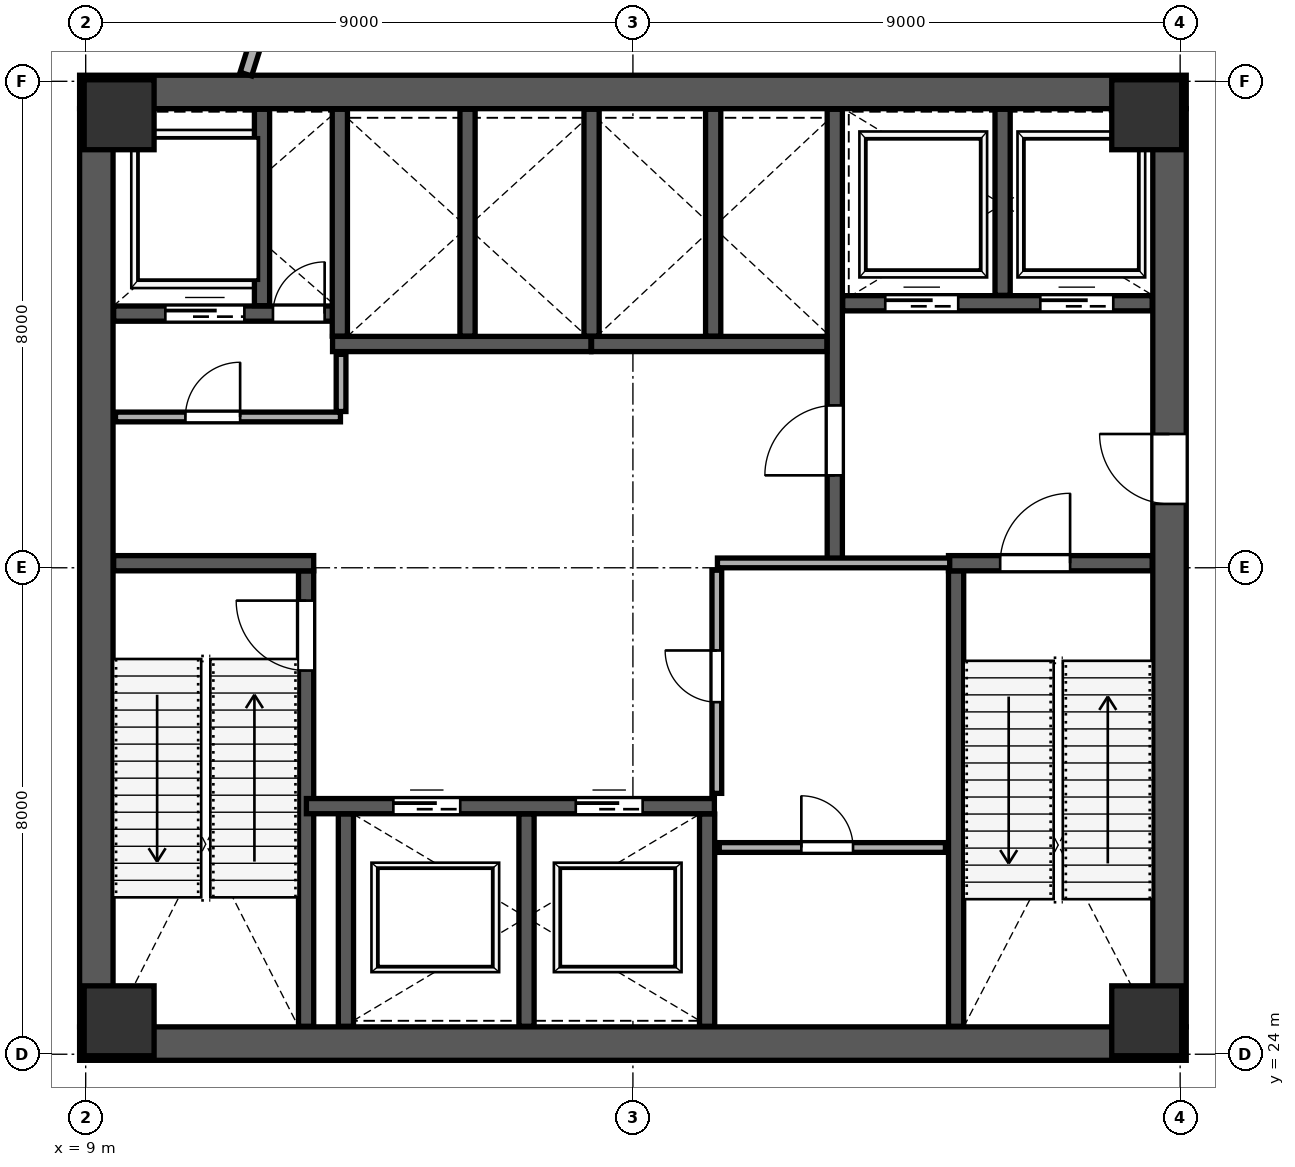
"""IFC4 building model, lengths in metres.
Left out: names, types, materials, properties, quantities, classifications, styles, units other than length and angle.
Written with IfcOpenShell. Run it as: python <this file> out.ifc"""

import sys

from ifc_helpers import new_model, si_unit, direction, frame, frame_2d, origin, origin_2d, place, context, subcontext, project, spatial, rectangle, extrude, source, transform, mapped, element, fill, save


model = new_model("IFC4")
c1 = context("Model", 3, precision=1e-05, world=origin(), true_north=direction((0.0, 1.0)))
c2 = subcontext(c1, "Body", "Model", "MODEL_VIEW")
j1 = project(units=[si_unit("LENGTHUNIT", "METRE"), si_unit("PLANEANGLEUNIT", "RADIAN")], contexts=[c1])
p1 = place(None, origin())
s1 = spatial("IfcSite", under=j1, at=p1, CompositionType="ELEMENT")
p2 = place(p1, origin())
s2 = spatial("IfcBuilding", under=s1, at=p2, CompositionType="ELEMENT")
p3 = place(p2, frame((0.0, 0.0, 122.2)))
s3 = spatial("IfcBuildingStorey", under=s2, at=p3, CompositionType="ELEMENT", Elevation=122.2)
m1 = source(origin(), c2, "Body", "SweptSolid", [
    extrude(rectangle(XDim=1.15, YDim=1.15, at=origin_2d()), origin(), (0.0, 0.0, 1.0), 5.399),
])
for number, where, z_axis, x_axis in (
    (1, (9.55, 24.55, 0.001), (0.0, 0.0, 1.0), (1.0, 0.0, 0.0)),
    (2, (26.45, 24.55, 0.001), (0.0, 0.0, 1.0), (1.0, 0.0, 0.0)),
    (3, (9.55, 39.45, 0.001), (0.0, 0.0, 1.0), (1.0, 0.0, 0.0)),
    (4, (26.45, 39.45, 0.001), (0.0, 0.0, 1.0), (1.0, 0.0, 0.0)),
):
    element("IfcColumn", number, at=place(p3, frame(where, z_axis=z_axis, x_axis=x_axis)), inside=s3, PredefinedType="COLUMN", context=c2, shape_type="MappedRepresentation", body=[
        mapped(m1, transform((0.0, 0.0, 0.0), scale=1.0)),
    ])
p4 = place(p3, frame((9.175, 24.45, 0.0), z_axis=(0.0, 0.0, 1.0), x_axis=(0.0, 1.0, 0.0)))
e5 = element("IfcWall", 5, at=p4, inside=s3, PredefinedType="SHEAR", context=c2, shape_type="SweptSolid", body=[
    extrude(rectangle(XDim=15.1, YDim=0.55, at=frame_2d((7.55, 0.0))), origin(), (0.0, 0.0, 1.0), 5.12),
])
p5 = place(p3, frame((26.825, 24.45, 0.0), z_axis=(0.0, 0.0, 1.0), x_axis=(0.0, 1.0, 0.0)))
e6 = element("IfcWall", 6, at=p5, inside=s3, PredefinedType="SHEAR", context=c2, shape_type="SweptSolid", body=[
    extrude(rectangle(XDim=15.1, YDim=0.55, at=frame_2d((7.55, 0.0))), origin(), (0.0, 0.0, 1.0), 5.12),
])
p6 = place(p5, frame((8.6, 0.0, 0.0)))
e7 = element("IfcOpeningElement", 7, at=p6, cuts=e6, PredefinedType="OPENING", context=c2, shape_type="SweptSolid", body=[
    extrude(rectangle(XDim=1.15, YDim=2.2, at=frame_2d((0.575, 1.1))), frame((0.0, 0.285, 0.0), z_axis=(0.0, -1.0, 0.0), x_axis=(1.0, 0.0, 0.0)), (0.0, 0.0, 1.0), 0.57),
])
for number, where, z_axis, x_axis in (
    (8, (8.9, 24.175, 0.0), (0.0, 0.0, 1.0), (1.0, 0.0, 0.0)),
    (9, (8.9, 39.825, 0.0), (0.0, 0.0, 1.0), (1.0, 0.0, 0.0)),
):
    element("IfcWall", number, at=place(p3, frame(where, z_axis=z_axis, x_axis=x_axis)), inside=s3, PredefinedType="SHEAR", context=c2, shape_type="SweptSolid", body=[
        extrude(rectangle(XDim=18.2, YDim=0.55, at=frame_2d((9.1, 0.0))), origin(), (0.0, 0.0, 1.0), 5.12),
    ])
p7 = place(p3, frame((12.625, 24.46, 0.0), z_axis=(0.0, 0.0, 1.0), x_axis=(0.0, 1.0, 0.0)))
e10 = element("IfcWall", 10, at=p7, inside=s3, PredefinedType="SHEAR", context=c2, shape_type="SweptSolid", body=[
    extrude(rectangle(XDim=7.49, YDim=0.25, at=frame_2d((3.745, 0.0))), origin(), (0.0, 0.0, 1.0), 5.12),
])
p8 = place(p7, frame((5.85, 0.0, 0.0)))
e11 = element("IfcOpeningElement", 11, at=p8, cuts=e10, PredefinedType="OPENING", context=c2, shape_type="SweptSolid", body=[
    extrude(rectangle(XDim=1.15, YDim=2.2, at=frame_2d((0.575, 1.1))), frame((0.0, 0.135, 0.0), z_axis=(0.0, -1.0, 0.0), x_axis=(1.0, 0.0, 0.0)), (0.0, 0.0, 1.0), 0.27),
])
p9 = place(p3, frame((9.46, 32.075, 0.0), z_axis=(0.0, 0.0, 1.0), x_axis=(1.0, 0.0, 0.0)))
e12 = element("IfcWall", 12, at=p9, inside=s3, PredefinedType="SHEAR", context=c2, shape_type="SweptSolid", body=[
    extrude(rectangle(XDim=3.29, YDim=0.25, at=frame_2d((1.645, 0.0))), origin(), (0.0, 0.0, 1.0), 5.12),
])
p10 = place(p3, frame((23.315, 24.46, 0.0), z_axis=(0.0, 0.0, 1.0), x_axis=(0.0, 1.0, 0.0)))
e13 = element("IfcWall", 13, at=p10, inside=s3, PredefinedType="SHEAR", context=c2, shape_type="SweptSolid", body=[
    extrude(rectangle(XDim=7.49, YDim=0.25, at=frame_2d((3.745, 0.0))), origin(), (0.0, 0.0, 1.0), 5.12),
])
p11 = place(p3, frame((23.19, 32.075, 0.0), z_axis=(0.0, 0.0, 1.0), x_axis=(1.0, 0.0, 0.0)))
e14 = element("IfcWall", 14, at=p11, inside=s3, PredefinedType="SHEAR", context=c2, shape_type="SweptSolid", body=[
    extrude(rectangle(XDim=3.35, YDim=0.25, at=frame_2d((1.675, 0.0))), origin(), (0.0, 0.0, 1.0), 5.12),
])
p12 = place(p11, frame((0.85, 0.0, 0.0)))
e15 = element("IfcOpeningElement", 15, at=p12, cuts=e14, PredefinedType="OPENING", context=c2, shape_type="SweptSolid", body=[
    extrude(rectangle(XDim=1.15, YDim=2.2, at=frame_2d((0.575, 1.1))), frame((0.0, 0.135, 0.0), z_axis=(0.0, -1.0, 0.0), x_axis=(1.0, 0.0, 0.0)), (0.0, 0.0, 1.0), 0.27),
])
p13 = place(p3, frame((21.32, 32.12, 0.0), z_axis=(0.0, 0.0, 1.0), x_axis=(0.0, 1.0, 0.0)))
e16 = element("IfcWall", 16, at=p13, inside=s3, PredefinedType="SHEAR", context=c2, shape_type="SweptSolid", body=[
    extrude(rectangle(XDim=7.42, YDim=0.25, at=frame_2d((3.71, 0.0))), origin(), (0.0, 0.0, 1.0), 5.12),
])
p14 = place(p13, frame((1.4, 0.0, 0.0)))
e17 = element("IfcOpeningElement", 17, at=p14, cuts=e16, PredefinedType="OPENING", context=c2, shape_type="SweptSolid", body=[
    extrude(rectangle(XDim=1.15, YDim=2.2, at=frame_2d((0.575, 1.1))), frame((0.0, 0.135, 0.0), z_axis=(0.0, -1.0, 0.0), x_axis=(1.0, 0.0, 0.0)), (0.0, 0.0, 1.0), 0.27),
])
p15 = place(p3, frame((9.46, 36.18, 0.0), z_axis=(0.0, 0.0, 1.0), x_axis=(1.0, 0.0, 0.0)))
e18 = element("IfcWall", 18, at=p15, inside=s3, PredefinedType="SHEAR", context=c2, shape_type="SweptSolid", body=[
    extrude(rectangle(XDim=3.79, YDim=0.25, at=frame_2d((1.895, 0.0))), origin(), (0.0, 0.0, 1.0), 5.12),
])
p16 = place(p15, frame((2.62, 0.0, 0.0)))
e19 = element("IfcOpeningElement", 19, at=p16, cuts=e18, PredefinedType="OPENING", context=c2, shape_type="SweptSolid", body=[
    extrude(rectangle(XDim=0.85, YDim=2.1, at=frame_2d((0.425, 1.05))), frame((0.0, 0.135, 0.0), z_axis=(0.0, -1.0, 0.0), x_axis=(1.0, 0.0, 0.0)), (0.0, 0.0, 1.0), 0.27),
])
p17 = place(p15, frame((0.85, 0.0, 0.0)))
e20 = element("IfcOpeningElement", 20, at=p17, cuts=e18, PredefinedType="OPENING", context=c2, shape_type="SweptSolid", body=[
    extrude(rectangle(XDim=1.3, YDim=2.25, at=frame_2d((0.65, 1.125))), frame((0.0, 0.135, 0.0), z_axis=(0.0, -1.0, 0.0), x_axis=(1.0, 0.0, 0.0)), (0.0, 0.0, 1.0), 0.27),
])
p18 = place(p3, frame((11.9, 36.31, 0.0), z_axis=(0.0, 0.0, 1.0), x_axis=(0.0, 1.0, 0.0)))
e21 = element("IfcWall", 21, at=p18, inside=s3, PredefinedType="SHEAR", context=c2, shape_type="SweptSolid", body=[
    extrude(rectangle(XDim=3.23, YDim=0.25, at=frame_2d((1.615, 0.0))), origin(), (0.0, 0.0, 1.0), 5.12),
])
p19 = place(p3, frame((21.45, 36.35, 0.0), z_axis=(0.0, 0.0, 1.0), x_axis=(1.0, 0.0, 0.0)))
e22 = element("IfcWall", 22, at=p19, inside=s3, PredefinedType="SHEAR", context=c2, shape_type="SweptSolid", body=[
    extrude(rectangle(XDim=5.09, YDim=0.25, at=frame_2d((2.545, 0.0))), origin(), (0.0, 0.0, 1.0), 5.12),
])
p20 = place(p19, frame((0.7, 0.0, 0.0)))
e23 = element("IfcOpeningElement", 23, at=p20, cuts=e22, PredefinedType="OPENING", context=c2, shape_type="SweptSolid", body=[
    extrude(rectangle(XDim=1.2, YDim=2.2, at=frame_2d((0.6, 1.1))), frame((0.0, 0.135, 0.0), z_axis=(0.0, -1.0, 0.0), x_axis=(1.0, 0.0, 0.0)), (0.0, 0.0, 1.0), 0.27),
])
p21 = place(p19, frame((3.25, 0.0, 0.0)))
e24 = element("IfcOpeningElement", 24, at=p21, cuts=e22, PredefinedType="OPENING", context=c2, shape_type="SweptSolid", body=[
    extrude(rectangle(XDim=1.2, YDim=2.2, at=frame_2d((0.6, 1.1))), frame((0.0, 0.135, 0.0), z_axis=(0.0, -1.0, 0.0), x_axis=(1.0, 0.0, 0.0)), (0.0, 0.0, 1.0), 0.27),
])
p22 = place(p3, frame((24.08, 36.48, 0.0), z_axis=(0.0, 0.0, 1.0), x_axis=(0.0, 1.0, 0.0)))
e25 = element("IfcWall", 25, at=p22, inside=s3, PredefinedType="SHEAR", context=c2, shape_type="SweptSolid", body=[
    extrude(rectangle(XDim=3.06, YDim=0.25, at=frame_2d((1.53, 0.0))), origin(), (0.0, 0.0, 1.0), 5.12),
])
p23 = place(p3, frame((12.63, 28.08, 0.0), z_axis=(0.0, 0.0, 1.0), x_axis=(1.0, 0.0, 0.0)))
e26 = element("IfcWall", 26, at=p23, inside=s3, PredefinedType="SHEAR", context=c2, shape_type="SweptSolid", body=[
    extrude(rectangle(XDim=6.71, YDim=0.25, at=frame_2d((3.355, 0.0))), origin(), (0.0, 0.0, 1.0), 5.12),
])
p24 = place(p23, frame((1.43, 0.0, 0.0)))
e27 = element("IfcOpeningElement", 27, at=p24, cuts=e26, PredefinedType="OPENING", context=c2, shape_type="SweptSolid", body=[
    extrude(rectangle(XDim=1.1, YDim=2.2, at=frame_2d((0.55, 1.1))), frame((0.0, 0.135, 0.0), z_axis=(0.0, -1.0, 0.0), x_axis=(1.0, 0.0, 0.0)), (0.0, 0.0, 1.0), 0.27),
])
p25 = place(p23, frame((4.43, 0.0, 0.0)))
e28 = element("IfcOpeningElement", 28, at=p25, cuts=e26, PredefinedType="OPENING", context=c2, shape_type="SweptSolid", body=[
    extrude(rectangle(XDim=1.1, YDim=2.2, at=frame_2d((0.55, 1.1))), frame((0.0, 0.135, 0.0), z_axis=(0.0, -1.0, 0.0), x_axis=(1.0, 0.0, 0.0)), (0.0, 0.0, 1.0), 0.27),
])
for number, where, z_axis, x_axis in (
    (29, (13.28, 24.46, 0.0), (0.0, 0.0, 1.0), (0.0, 1.0, 0.0)),
    (30, (16.25, 24.46, 0.0), (0.0, 0.0, 1.0), (0.0, 1.0, 0.0)),
    (31, (19.22, 24.46, 0.0), (0.0, 0.0, 1.0), (0.0, 1.0, 0.0)),
):
    element("IfcWall", number, at=place(p3, frame(where, z_axis=z_axis, x_axis=x_axis)), inside=s3, PredefinedType="SHEAR", context=c2, shape_type="SweptSolid", body=[
        extrude(rectangle(XDim=3.49, YDim=0.25, at=frame_2d((1.745, 0.0))), origin(), (0.0, 0.0, 1.0), 5.12),
    ])
p26 = place(p3, frame((13.06, 35.68, 0.0), z_axis=(0.0, 0.0, 1.0), x_axis=(1.0, 0.0, 0.0)))
e32 = element("IfcWall", 32, at=p26, inside=s3, PredefinedType="SHEAR", context=c2, shape_type="SweptSolid", body=[
    extrude(rectangle(XDim=4.25, YDim=0.25, at=frame_2d((2.125, 0.0))), origin(), (0.0, 0.0, 1.0), 5.12),
])
for number, where, z_axis, x_axis in (
    (33, (13.18, 35.81, 0.0), (0.0, 0.0, 1.0), (0.0, 1.0, 0.0)),
    (34, (15.28, 35.81, 0.0), (0.0, 0.0, 1.0), (0.0, 1.0, 0.0)),
):
    element("IfcWall", number, at=place(p3, frame(where, z_axis=z_axis, x_axis=x_axis)), inside=s3, PredefinedType="SHEAR", context=c2, shape_type="SweptSolid", body=[
        extrude(rectangle(XDim=3.73, YDim=0.25, at=frame_2d((1.865, 0.0))), origin(), (0.0, 0.0, 1.0), 5.12),
    ])
p27 = place(p3, frame((17.32, 35.68, 0.0), z_axis=(0.0, 0.0, 1.0), x_axis=(1.0, 0.0, 0.0)))
e35 = element("IfcWall", 35, at=p27, inside=s3, PredefinedType="SHEAR", context=c2, shape_type="SweptSolid", body=[
    extrude(rectangle(XDim=3.87, YDim=0.25, at=frame_2d((1.935, 0.0))), origin(), (0.0, 0.0, 1.0), 5.12),
])
for number, where, z_axis, x_axis in (
    (36, (17.32, 35.81, 0.0), (0.0, 0.0, 1.0), (0.0, 1.0, 0.0)),
    (37, (19.32, 35.81, 0.0), (0.0, 0.0, 1.0), (0.0, 1.0, 0.0)),
):
    element("IfcWall", number, at=place(p3, frame(where, z_axis=z_axis, x_axis=x_axis)), inside=s3, PredefinedType="SHEAR", context=c2, shape_type="SweptSolid", body=[
        extrude(rectangle(XDim=3.73, YDim=0.25, at=frame_2d((1.865, 0.0))), origin(), (0.0, 0.0, 1.0), 5.12),
    ])
p28 = place(p3, frame((9.49, 34.48, 0.0), z_axis=(0.0, 0.0, 1.0), x_axis=(1.0, 0.0, 0.0)))
e38 = element("IfcWall", 38, at=p28, inside=s3, PredefinedType="PARTITIONING", context=c2, shape_type="SweptSolid", body=[
    extrude(rectangle(XDim=3.7, YDim=0.16, at=frame_2d((1.85, 0.0))), origin(), (0.0, 0.0, 1.0), 5.12),
])
p29 = place(p28, frame((1.15, 0.0, 0.0)))
e39 = element("IfcOpeningElement", 39, at=p29, cuts=e38, PredefinedType="OPENING", context=c2, shape_type="SweptSolid", body=[
    extrude(rectangle(XDim=0.9, YDim=2.15, at=frame_2d((0.45, 1.075))), frame((0.0, 0.09, 0.0), z_axis=(0.0, -1.0, 0.0), x_axis=(1.0, 0.0, 0.0)), (0.0, 0.0, 1.0), 0.18),
])
p30 = place(p3, frame((13.2, 34.57, 0.0), z_axis=(0.0, 0.0, 1.0), x_axis=(0.0, 1.0, 0.0)))
e40 = element("IfcWall", 40, at=p30, inside=s3, PredefinedType="PARTITIONING", context=c2, shape_type="SweptSolid", body=[
    extrude(rectangle(XDim=0.94, YDim=0.16, at=frame_2d((0.47, 0.0))), origin(), (0.0, 0.0, 1.0), 5.12),
])
p31 = place(p3, frame((19.39, 32.08, 0.0), z_axis=(0.0, 0.0, 1.0), x_axis=(1.0, 0.0, 0.0)))
e41 = element("IfcWall", 41, at=p31, inside=s3, PredefinedType="PARTITIONING", context=c2, shape_type="SweptSolid", body=[
    extrude(rectangle(XDim=3.82, YDim=0.16, at=frame_2d((1.91, 0.0))), origin(), (0.0, 0.0, 1.0), 5.12),
])
p32 = place(p3, frame((19.38, 28.29, 0.0), z_axis=(0.0, 0.0, 1.0), x_axis=(0.0, 1.0, 0.0)))
e42 = element("IfcWall", 42, at=p32, inside=s3, PredefinedType="PARTITIONING", context=c2, shape_type="SweptSolid", body=[
    extrude(rectangle(XDim=3.67, YDim=0.16, at=frame_2d((1.835, 0.0))), origin(), (0.0, 0.0, 1.0), 5.12),
])
p33 = place(p32, frame((1.5, 0.0, 0.0)))
e43 = element("IfcOpeningElement", 43, at=p33, cuts=e42, PredefinedType="OPENING", context=c2, shape_type="SweptSolid", body=[
    extrude(rectangle(XDim=0.85, YDim=2.1, at=frame_2d((0.425, 1.05))), frame((0.0, 0.09, 0.0), z_axis=(0.0, -1.0, 0.0), x_axis=(1.0, 0.0, 0.0)), (0.0, 0.0, 1.0), 0.18),
])
p34 = place(p3, frame((19.42, 27.4, 0.0), z_axis=(0.0, 0.0, 1.0), x_axis=(1.0, 0.0, 0.0)))
e44 = element("IfcWall", 44, at=p34, inside=s3, PredefinedType="PARTITIONING", context=c2, shape_type="SweptSolid", body=[
    extrude(rectangle(XDim=3.72, YDim=0.16, at=frame_2d((1.86, 0.0))), origin(), (0.0, 0.0, 1.0), 5.12),
])
p35 = place(p34, frame((1.35, 0.0, 0.0)))
e45 = element("IfcOpeningElement", 45, at=p35, cuts=e44, PredefinedType="OPENING", context=c2, shape_type="SweptSolid", body=[
    extrude(rectangle(XDim=0.85, YDim=2.1, at=frame_2d((0.425, 1.05))), frame((0.0, 0.09, 0.0), z_axis=(0.0, -1.0, 0.0), x_axis=(1.0, 0.0, 0.0)), (0.0, 0.0, 1.0), 0.18),
])
p36 = place(p3, frame((24.884, 12.039, 0.0), z_axis=(0.0, 0.0, 1.0), x_axis=(0.300719056834, 0.953712770627, 0.0)))
e46 = element("IfcWall", 46, at=p36, inside=s3, PredefinedType="SOLIDWALL", context=c2, shape_type="SweptSolid", body=[
    extrude(rectangle(XDim=12.98, YDim=0.2, at=frame_2d((6.49, 0.0))), origin(), (0.0, 0.0, 1.0), 5.12),
])
p37 = place(p3, frame((11.635, 40.118, 0.0), z_axis=(0.0, 0.0, 1.0), x_axis=(0.300686932812, 0.953722899188, 0.0)))
e47 = element("IfcWall", 47, at=p37, inside=s3, PredefinedType="SOLIDWALL", context=c2, shape_type="SweptSolid", body=[
    extrude(rectangle(XDim=5.784, YDim=0.2, at=frame_2d((2.892, 0.0))), origin(), (0.0, 0.0, 1.0), 5.12),
])
p38 = place(p37, frame((3.56, 0.0, 0.0)))
e48 = element("IfcOpeningElement", 48, at=p38, cuts=e47, PredefinedType="OPENING", context=c2, shape_type="SweptSolid", body=[
    extrude(rectangle(XDim=1.2, YDim=2.2, at=frame_2d((0.6, 1.1))), frame((0.0, 0.11, 0.0), z_axis=(0.0, -1.0, 0.0), x_axis=(1.0, 0.0, 0.0)), (0.0, 0.0, 1.0), 0.22),
])
m2 = source(origin(), c2, "Body", "SweptSolid", [
    extrude(rectangle(XDim=1.15, YDim=2.2, at=frame_2d((0.575, 1.1))), frame((0.0, 0.025, 0.0), z_axis=(0.0, -1.0, 0.0), x_axis=(1.0, 0.0, 0.0)), (0.0, 0.0, 1.0), 0.05),
])
p39 = place(p8, origin())
e49 = element("IfcDoor", 49, at=p39, inside=s3, OperationType="SINGLE_SWING_RIGHT", PredefinedType="DOOR", context=c2, shape_type="MappedRepresentation", body=[
    mapped(m2, transform((0.0, 0.0, 0.0), scale=1.0)),
])
fill(e11, e49)
m3 = source(origin(), c2, "Body", "SweptSolid", [
    extrude(rectangle(XDim=1.15, YDim=2.2, at=frame_2d((0.575, 1.1))), frame((0.0, 0.025, 0.0), z_axis=(0.0, -1.0, 0.0), x_axis=(1.0, 0.0, 0.0)), (0.0, 0.0, 1.0), 0.05),
])
p40 = place(p14, origin())
e50 = element("IfcDoor", 50, at=p40, inside=s3, OperationType="SINGLE_SWING_LEFT", PredefinedType="DOOR", context=c2, shape_type="MappedRepresentation", body=[
    mapped(m3, transform((0.0, 0.0, 0.0), scale=1.0)),
])
fill(e17, e50)
p41 = place(p12, origin())
e51 = element("IfcDoor", 51, at=p41, inside=s3, OperationType="SINGLE_SWING_RIGHT", PredefinedType="DOOR", context=c2, shape_type="MappedRepresentation", body=[
    mapped(m2, transform((0.0, 0.0, 0.0), scale=1.0)),
])
fill(e15, e51)
p42 = place(p6, origin())
e52 = element("IfcDoor", 52, at=p42, inside=s3, OperationType="SINGLE_SWING_RIGHT", PredefinedType="DOOR", context=c2, shape_type="MappedRepresentation", body=[
    mapped(m3, transform((0.0, 0.0, 0.0), scale=1.0)),
])
fill(e7, e52)
m4 = source(origin(), c2, "Body", "SweptSolid", [
    extrude(rectangle(XDim=0.85, YDim=2.1, at=frame_2d((0.425, 1.05))), frame((0.0, 0.025, 0.0), z_axis=(0.0, -1.0, 0.0), x_axis=(1.0, 0.0, 0.0)), (0.0, 0.0, 1.0), 0.05),
])
p43 = place(p16, origin())
e53 = element("IfcDoor", 53, at=p43, inside=s3, OperationType="SINGLE_SWING_RIGHT", PredefinedType="DOOR", context=c2, shape_type="MappedRepresentation", body=[
    mapped(m4, transform((0.0, 0.0, 0.0), scale=1.0)),
])
fill(e19, e53)
m5 = source(origin(), c2, "Body", "SweptSolid", [
    extrude(rectangle(XDim=1.1, YDim=2.2, at=frame_2d((0.55, 1.1))), frame((0.0, 0.025, 0.0), z_axis=(0.0, -1.0, 0.0), x_axis=(1.0, 0.0, 0.0)), (0.0, 0.0, 1.0), 0.05),
])
p44 = place(p24, origin())
e54 = element("IfcDoor", 54, at=p44, inside=s3, OperationType="SLIDING_TO_LEFT", PredefinedType="DOOR", context=c2, shape_type="MappedRepresentation", body=[
    mapped(m5, transform((0.0, 0.0, 0.0), scale=1.0)),
])
fill(e27, e54)
p45 = place(p25, origin())
e55 = element("IfcDoor", 55, at=p45, inside=s3, OperationType="SLIDING_TO_RIGHT", PredefinedType="DOOR", context=c2, shape_type="MappedRepresentation", body=[
    mapped(m5, transform((0.0, 0.0, 0.0), scale=1.0)),
])
fill(e28, e55)
m6 = source(origin(), c2, "Body", "SweptSolid", [
    extrude(rectangle(XDim=1.2, YDim=2.2, at=frame_2d((0.6, 1.1))), frame((0.0, 0.025, 0.0), z_axis=(0.0, -1.0, 0.0), x_axis=(1.0, 0.0, 0.0)), (0.0, 0.0, 1.0), 0.05),
])
p46 = place(p20, origin())
e56 = element("IfcDoor", 56, at=p46, inside=s3, OperationType="SLIDING_TO_LEFT", PredefinedType="DOOR", context=c2, shape_type="MappedRepresentation", body=[
    mapped(m6, transform((0.0, 0.0, 0.0), scale=1.0)),
])
fill(e23, e56)
p47 = place(p21, origin())
e57 = element("IfcDoor", 57, at=p47, inside=s3, OperationType="SLIDING_TO_RIGHT", PredefinedType="DOOR", context=c2, shape_type="MappedRepresentation", body=[
    mapped(m6, transform((0.0, 0.0, 0.0), scale=1.0)),
])
fill(e24, e57)
m7 = source(origin(), c2, "Body", "SweptSolid", [
    extrude(rectangle(XDim=1.3, YDim=2.25, at=frame_2d((0.65, 1.125))), frame((0.0, 0.025, 0.0), z_axis=(0.0, -1.0, 0.0), x_axis=(1.0, 0.0, 0.0)), (0.0, 0.0, 1.0), 0.05),
])
p48 = place(p17, origin())
e58 = element("IfcDoor", 58, at=p48, inside=s3, OperationType="SLIDING_TO_LEFT", PredefinedType="DOOR", context=c2, shape_type="MappedRepresentation", body=[
    mapped(m7, transform((0.0, 0.0, 0.0), scale=1.0)),
])
fill(e20, e58)
m8 = source(origin(), c2, "Body", "SweptSolid", [
    extrude(rectangle(XDim=0.9, YDim=2.15, at=frame_2d((0.45, 1.075))), frame((0.0, 0.025, 0.0), z_axis=(0.0, -1.0, 0.0), x_axis=(1.0, 0.0, 0.0)), (0.0, 0.0, 1.0), 0.05),
])
p49 = place(p29, origin())
e59 = element("IfcDoor", 59, at=p49, inside=s3, OperationType="SINGLE_SWING_RIGHT", PredefinedType="DOOR", context=c2, shape_type="MappedRepresentation", body=[
    mapped(m8, transform((0.0, 0.0, 0.0), scale=1.0)),
])
fill(e39, e59)
p50 = place(p35, origin())
e60 = element("IfcDoor", 60, at=p50, inside=s3, OperationType="SINGLE_SWING_LEFT", PredefinedType="DOOR", context=c2, shape_type="MappedRepresentation", body=[
    mapped(m4, transform((0.0, 0.0, 0.0), scale=1.0)),
])
fill(e45, e60)
p51 = place(p33, origin())
e61 = element("IfcDoor", 61, at=p51, inside=s3, OperationType="SINGLE_SWING_RIGHT", PredefinedType="DOOR", context=c2, shape_type="MappedRepresentation", body=[
    mapped(m4, transform((0.0, 0.0, 0.0), scale=1.0)),
])
fill(e43, e61)
save(model, sys.argv[1])
